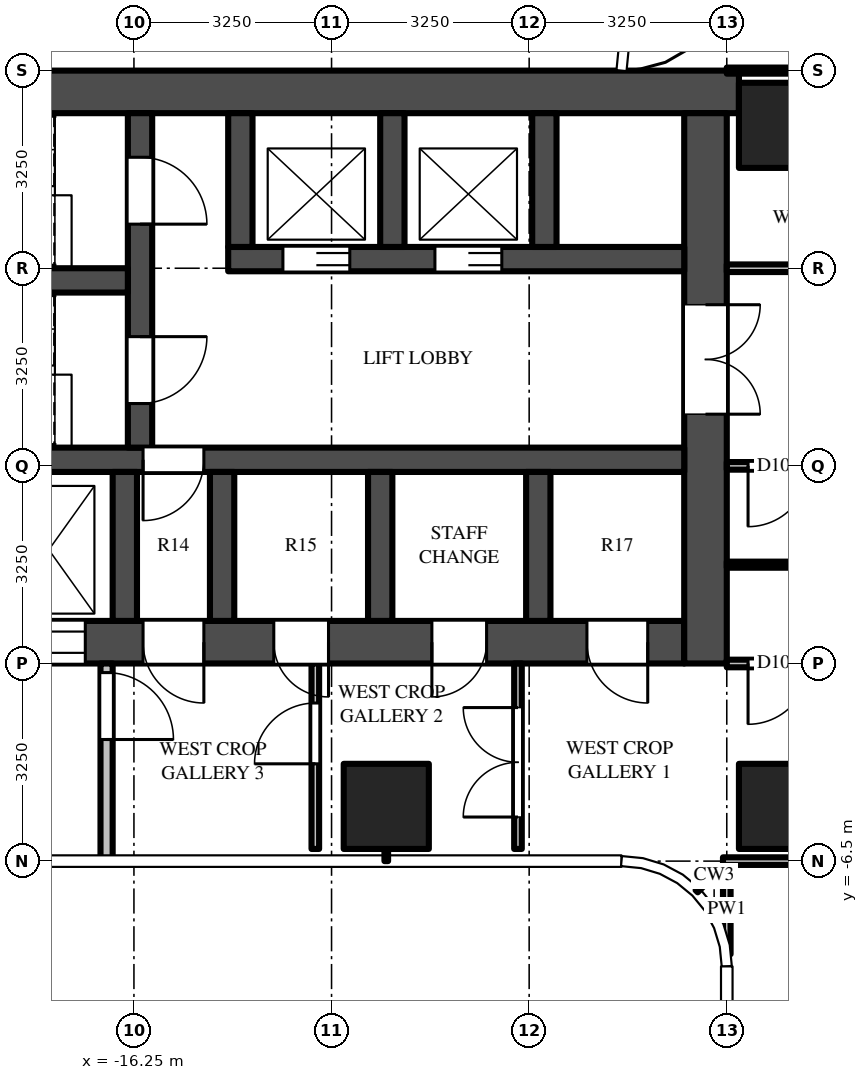
"""IFC4 building model, lengths in metres.
Left out: names, types, materials, properties, quantities, classifications, styles, units other than length and angle.
Written with IfcOpenShell. Run it as: python <this file> out.ifc"""

import sys

from ifc_helpers import new_model, si_unit, direction, frame, frame_2d, origin, origin_2d, place, context, subcontext, project, spatial, rectangle, extrude, source, transform, mapped, element, fill, save


model = new_model("IFC4")
c1 = context("Model", 3, precision=1e-05, world=origin(), true_north=direction((0.0, 1.0)))
c2 = subcontext(c1, "Body", "Model", "MODEL_VIEW")
j1 = project(units=[si_unit("LENGTHUNIT", "METRE"), si_unit("PLANEANGLEUNIT", "RADIAN")], contexts=[c1])
p1 = place(None, origin())
s1 = spatial("IfcSite", under=j1, at=p1, CompositionType="ELEMENT")
p2 = place(p1, origin())
s2 = spatial("IfcBuilding", under=s1, at=p2, CompositionType="ELEMENT")
p3 = place(p2, frame((0.0, 0.0, 88.0)))
s3 = spatial("IfcBuildingStorey", under=s2, at=p3, CompositionType="ELEMENT", Elevation=88.0)
m1 = source(origin(), c2, "Body", "SweptSolid", [
    extrude(rectangle(XDim=1.4, YDim=1.4, at=origin_2d()), origin(), (0.0, 0.0, 1.0), 4.5),
])
for number, where, z_axis, x_axis in (
    (1, (-5.6, 5.6, 0.0), (0.0, 0.0, 1.0), (1.0, 0.0, 0.0)),
    (2, (-5.6, -5.6, 0.0), (0.0, 0.0, 1.0), (1.0, 0.0, 0.0)),
    (3, (-12.1, -5.6, 0.0), (0.0, 0.0, 1.0), (1.0, 0.0, 0.0)),
):
    element("IfcColumn", number, at=place(p3, frame(where, z_axis=z_axis, x_axis=x_axis)), inside=s3, PredefinedType="COLUMN", context=c2, shape_type="MappedRepresentation", body=[
        mapped(m1, transform((0.0, 0.0, 0.0))),
    ])
m2 = source(origin(), c2, "Body", "SweptSolid", [
    extrude(rectangle(XDim=16.45, YDim=0.7, at=frame_2d((8.225, 0.0))), origin(), (0.0, 0.0, 1.0), 4.2),
])
p4 = place(p3, frame((-6.3, 6.15, 0.0), z_axis=(0.0, 0.0, 1.0), x_axis=(-1.0, 0.0, 0.0)))
e4 = element("IfcWall", 4, at=p4, inside=s3, PredefinedType="SHEAR", context=c2, shape_type="MappedRepresentation", body=[
    mapped(m2, transform((0.0, 0.0, 0.0))),
])
m3 = source(origin(), c2, "Body", "SweptSolid", [
    extrude(rectangle(XDim=14.85, YDim=0.7, at=frame_2d((7.425, 0.0))), origin(), (0.0, 0.0, 1.0), 4.2),
])
p5 = place(p3, frame((-7.2, -2.9, 0.0), z_axis=(0.0, 0.0, 1.0), x_axis=(-1.0, 0.0, 0.0)))
e5 = element("IfcWall", 5, at=p5, inside=s3, PredefinedType="SHEAR", context=c2, shape_type="MappedRepresentation", body=[
    mapped(m3, transform((0.0, 0.0, 0.0))),
])
m4 = source(origin(), c2, "Body", "SweptSolid", [
    extrude(rectangle(XDim=1.3, YDim=2.1, at=frame_2d((0.65, 1.05))), frame((0.0, 0.36, 0.0), z_axis=(0.0, -1.0, 0.0), x_axis=(1.0, 0.0, 0.0)), (0.0, 0.0, 1.0), 0.72),
])
p6 = place(p5, frame((12.2, 0.0, 0.0)))
e6 = element("IfcOpeningElement", 6, at=p6, cuts=e5, PredefinedType="OPENING", context=c2, shape_type="MappedRepresentation", body=[
    mapped(m4, transform((0.0, 0.0, 0.0))),
])
m5 = source(origin(), c2, "Body", "SweptSolid", [
    extrude(rectangle(XDim=1.2, YDim=2.1, at=frame_2d((0.6, 1.05))), frame((0.0, 0.36, 0.0), z_axis=(0.0, -1.0, 0.0), x_axis=(1.0, 0.0, 0.0)), (0.0, 0.0, 1.0), 0.72),
])
p7 = place(p5, frame((9.85, 0.0, 0.0)))
e7 = element("IfcOpeningElement", 7, at=p7, cuts=e5, PredefinedType="OPENING", context=c2, shape_type="MappedRepresentation", body=[
    mapped(m5, transform((0.0, 0.0, 0.0))),
])
m6 = source(origin(), c2, "Body", "SweptSolid", [
    extrude(rectangle(XDim=1.0, YDim=2.1, at=frame_2d((0.5, 1.05))), frame((0.0, 0.36, 0.0), z_axis=(0.0, -1.0, 0.0), x_axis=(1.0, 0.0, 0.0)), (0.0, 0.0, 1.0), 0.72),
])
p8 = place(p5, frame((7.9, 0.0, 0.0)))
e8 = element("IfcOpeningElement", 8, at=p8, cuts=e5, PredefinedType="OPENING", context=c2, shape_type="MappedRepresentation", body=[
    mapped(m6, transform((0.0, 0.0, 0.0))),
])
p9 = place(p5, frame((0.6, 0.0, 0.0)))
e9 = element("IfcOpeningElement", 9, at=p9, cuts=e5, PredefinedType="OPENING", context=c2, shape_type="MappedRepresentation", body=[
    mapped(m6, transform((0.0, 0.0, 0.0))),
])
m7 = source(origin(), c2, "Body", "SweptSolid", [
    extrude(rectangle(XDim=0.9, YDim=2.1, at=frame_2d((0.45, 1.05))), frame((0.0, 0.36, 0.0), z_axis=(0.0, -1.0, 0.0), x_axis=(1.0, 0.0, 0.0)), (0.0, 0.0, 1.0), 0.72),
])
p10 = place(p5, frame((3.25, 0.0, 0.0)))
e10 = element("IfcOpeningElement", 10, at=p10, cuts=e5, PredefinedType="OPENING", context=c2, shape_type="MappedRepresentation", body=[
    mapped(m7, transform((0.0, 0.0, 0.0))),
])
p11 = place(p5, frame((5.85, 0.0, 0.0)))
e11 = element("IfcOpeningElement", 11, at=p11, cuts=e5, PredefinedType="OPENING", context=c2, shape_type="MappedRepresentation", body=[
    mapped(m7, transform((0.0, 0.0, 0.0))),
])
m8 = source(origin(), c2, "Body", "SweptSolid", [
    extrude(rectangle(XDim=9.05, YDim=0.7, at=frame_2d((4.525, 0.0))), origin(), (0.0, 0.0, 1.0), 4.2),
])
p12 = place(p3, frame((-6.85, 5.8, 0.0), z_axis=(0.0, 0.0, 1.0), x_axis=(0.0, -1.0, 0.0)))
e12 = element("IfcWall", 12, at=p12, inside=s3, PredefinedType="SHEAR", context=c2, shape_type="MappedRepresentation", body=[
    mapped(m8, transform((0.0, 0.0, 0.0))),
])
m9 = source(origin(), c2, "Body", "SweptSolid", [
    extrude(rectangle(XDim=1.8, YDim=2.1, at=frame_2d((0.9, 1.05))), frame((0.0, 0.36, 0.0), z_axis=(0.0, -1.0, 0.0), x_axis=(1.0, 0.0, 0.0)), (0.0, 0.0, 1.0), 0.72),
])
p13 = place(p12, frame((3.15, 0.0, 0.0)))
e13 = element("IfcOpeningElement", 13, at=p13, cuts=e12, PredefinedType="OPENING", context=c2, shape_type="MappedRepresentation", body=[
    mapped(m9, transform((0.0, 0.0, 0.0))),
])
m10 = source(origin(), c2, "Body", "SweptSolid", [
    extrude(rectangle(XDim=7.5, YDim=0.4, at=frame_2d((3.75, 0.0))), origin(), (0.0, 0.0, 1.0), 4.2),
])
p14 = place(p3, frame((-7.2, 3.4, 0.0), z_axis=(0.0, 0.0, 1.0), x_axis=(-1.0, 0.0, 0.0)))
e14 = element("IfcWall", 14, at=p14, inside=s3, PredefinedType="SHEAR", context=c2, shape_type="MappedRepresentation", body=[
    mapped(m10, transform((0.0, 0.0, 0.0))),
])
m11 = source(origin(), c2, "Body", "SweptSolid", [
    extrude(rectangle(XDim=1.1, YDim=2.1, at=frame_2d((0.55, 1.05))), frame((0.0, 0.21, 0.0), z_axis=(0.0, -1.0, 0.0), x_axis=(1.0, 0.0, 0.0)), (0.0, 0.0, 1.0), 0.42),
])
p15 = place(p14, frame((3.0, 0.0, 0.0)))
e15 = element("IfcOpeningElement", 15, at=p15, cuts=e14, PredefinedType="OPENING", context=c2, shape_type="MappedRepresentation", body=[
    mapped(m11, transform((0.0, 0.0, 0.0))),
])
p16 = place(p14, frame((5.5, 0.0, 0.0)))
e16 = element("IfcOpeningElement", 16, at=p16, cuts=e14, PredefinedType="OPENING", context=c2, shape_type="MappedRepresentation", body=[
    mapped(m11, transform((0.0, 0.0, 0.0))),
])
m12 = source(origin(), c2, "Body", "SweptSolid", [
    extrude(rectangle(XDim=14.85, YDim=0.4, at=frame_2d((7.425, 0.0))), origin(), (0.0, 0.0, 1.0), 4.2),
])
p17 = place(p3, frame((-7.2, 0.1, 0.0), z_axis=(0.0, 0.0, 1.0), x_axis=(-1.0, 0.0, 0.0)))
e17 = element("IfcWall", 17, at=p17, inside=s3, PredefinedType="SHEAR", context=c2, shape_type="MappedRepresentation", body=[
    mapped(m12, transform((0.0, 0.0, 0.0))),
])
m13 = source(origin(), c2, "Body", "SweptSolid", [
    extrude(rectangle(XDim=1.0, YDim=2.1, at=frame_2d((0.5, 1.05))), frame((0.0, 0.21, 0.0), z_axis=(0.0, -1.0, 0.0), x_axis=(1.0, 0.0, 0.0)), (0.0, 0.0, 1.0), 0.42),
])
p18 = place(p17, frame((7.9, 0.0, 0.0)))
e18 = element("IfcOpeningElement", 18, at=p18, cuts=e17, PredefinedType="OPENING", context=c2, shape_type="MappedRepresentation", body=[
    mapped(m13, transform((0.0, 0.0, 0.0))),
])
m14 = source(origin(), c2, "Body", "SweptSolid", [
    extrude(rectangle(XDim=5.5, YDim=0.4, at=frame_2d((2.75, 0.0))), origin(), (0.0, 0.0, 1.0), 4.2),
])
p19 = place(p3, frame((-16.15, 5.8, 0.0), z_axis=(0.0, 0.0, 1.0), x_axis=(0.0, -1.0, 0.0)))
e19 = element("IfcWall", 19, at=p19, inside=s3, PredefinedType="SHEAR", context=c2, shape_type="MappedRepresentation", body=[
    mapped(m14, transform((0.0, 0.0, 0.0))),
])
p20 = place(p19, frame((0.725, 0.0, 0.0)))
e20 = element("IfcOpeningElement", 20, at=p20, cuts=e19, PredefinedType="OPENING", context=c2, shape_type="MappedRepresentation", body=[
    mapped(m11, transform((0.0, 0.0, 0.0))),
])
p21 = place(p19, frame((3.675, 0.0, 0.0)))
e21 = element("IfcOpeningElement", 21, at=p21, cuts=e19, PredefinedType="OPENING", context=c2, shape_type="MappedRepresentation", body=[
    mapped(m11, transform((0.0, 0.0, 0.0))),
])
m15 = source(origin(), c2, "Body", "SweptSolid", [
    extrude(rectangle(XDim=5.7, YDim=0.4, at=frame_2d((2.85, 0.0))), origin(), (0.0, 0.0, 1.0), 4.2),
])
p22 = place(p3, frame((-16.35, 3.05, 0.0), z_axis=(0.0, 0.0, 1.0), x_axis=(-1.0, 0.0, 0.0)))
e22 = element("IfcWall", 22, at=p22, inside=s3, PredefinedType="SHEAR", context=c2, shape_type="MappedRepresentation", body=[
    mapped(m15, transform((0.0, 0.0, 0.0))),
])
m16 = source(origin(), c2, "Body", "SweptSolid", [
    extrude(rectangle(XDim=2.2, YDim=0.4, at=frame_2d((1.1, 0.0))), origin(), (0.0, 0.0, 1.0), 4.2),
])
for number, where, z_axis, x_axis in (
    (23, (-9.5, 5.8, 0.0), (0.0, 0.0, 1.0), (0.0, -1.0, 0.0)),
    (24, (-12.0, 5.8, 0.0), (0.0, 0.0, 1.0), (0.0, -1.0, 0.0)),
    (25, (-14.5, 5.8, 0.0), (0.0, 0.0, 1.0), (0.0, -1.0, 0.0)),
):
    element("IfcWall", number, at=place(p3, frame(where, z_axis=z_axis, x_axis=x_axis)), inside=s3, PredefinedType="SHEAR", context=c2, shape_type="MappedRepresentation", body=[
        mapped(m16, transform((0.0, 0.0, 0.0))),
    ])
m17 = source(origin(), c2, "Body", "SweptSolid", [
    extrude(rectangle(XDim=2.45, YDim=0.4, at=frame_2d((1.225, 0.0))), origin(), (0.0, 0.0, 1.0), 4.2),
])
for number, where, z_axis, x_axis in (
    (26, (-9.6, -0.1, 0.0), (0.0, 0.0, 1.0), (0.0, -1.0, 0.0)),
    (27, (-12.2, -0.1, 0.0), (0.0, 0.0, 1.0), (0.0, -1.0, 0.0)),
    (28, (-14.8, -0.1, 0.0), (0.0, 0.0, 1.0), (0.0, -1.0, 0.0)),
    (29, (-16.4, -0.1, 0.0), (0.0, 0.0, 1.0), (0.0, -1.0, 0.0)),
):
    element("IfcWall", number, at=place(p3, frame(where, z_axis=z_axis, x_axis=x_axis)), inside=s3, PredefinedType="SHEAR", context=c2, shape_type="MappedRepresentation", body=[
        mapped(m17, transform((0.0, 0.0, 0.0))),
    ])
m18 = source(origin(), c2, "Body", "SweptSolid", [
    extrude(rectangle(XDim=3.25, YDim=0.2, at=frame_2d((1.625, 0.0))), origin(), (0.0, 0.0, 1.0), 4.2),
])
p23 = place(p3, frame((-16.7, -3.25, 0.0), z_axis=(0.0, 0.0, 1.0), x_axis=(0.0, -1.0, 0.0)))
e30 = element("IfcWall", 30, at=p23, inside=s3, PredefinedType="PARTITIONING", context=c2, shape_type="MappedRepresentation", body=[
    mapped(m18, transform((0.0, 0.0, 0.0))),
])
m19 = source(origin(), c2, "Body", "SweptSolid", [
    extrude(rectangle(XDim=1.1, YDim=2.1, at=frame_2d((0.55, 1.05))), frame((0.0, 0.11, 0.0), z_axis=(0.0, -1.0, 0.0), x_axis=(1.0, 0.0, 0.0)), (0.0, 0.0, 1.0), 0.22),
])
p24 = place(p23, frame((0.15, 0.0, 0.0)))
e31 = element("IfcOpeningElement", 31, at=p24, cuts=e30, PredefinedType="OPENING", context=c2, shape_type="MappedRepresentation", body=[
    mapped(m19, transform((0.0, 0.0, 0.0))),
])
m20 = source(origin(), c2, "Body", "SweptSolid", [
    extrude(rectangle(XDim=3.05, YDim=0.125, at=frame_2d((1.525, 0.0))), origin(), (0.0, 0.0, 1.0), 3.28),
])
p25 = place(p3, frame((-13.267, -6.3, 0.0), z_axis=(0.0, 0.0, 1.0), x_axis=(0.0, 1.0, 0.0)))
e32 = element("IfcWall", 32, at=p25, inside=s3, PredefinedType="PARTITIONING", context=c2, shape_type="MappedRepresentation", body=[
    mapped(m20, transform((0.0, 0.0, 0.0))),
])
m21 = source(origin(), c2, "Body", "SweptSolid", [
    extrude(rectangle(XDim=1.0, YDim=2.1, at=frame_2d((0.5, 1.05))), frame((0.0, 0.073, 0.0), z_axis=(0.0, -1.0, 0.0), x_axis=(1.0, 0.0, 0.0)), (0.0, 0.0, 1.0), 0.145),
])
p26 = place(p25, frame((1.4, 0.0, 0.0)))
e33 = element("IfcOpeningElement", 33, at=p26, cuts=e32, PredefinedType="OPENING", context=c2, shape_type="MappedRepresentation", body=[
    mapped(m21, transform((0.0, 0.0, 0.0))),
])
p27 = place(p3, frame((-9.934, -6.3, 0.0), z_axis=(0.0, 0.0, 1.0), x_axis=(0.0, 1.0, 0.0)))
e34 = element("IfcWall", 34, at=p27, inside=s3, PredefinedType="PARTITIONING", context=c2, shape_type="MappedRepresentation", body=[
    mapped(m20, transform((0.0, 0.0, 0.0))),
])
m22 = source(origin(), c2, "Body", "SweptSolid", [
    extrude(rectangle(XDim=1.8, YDim=2.1, at=frame_2d((0.9, 1.05))), frame((0.0, 0.073, 0.0), z_axis=(0.0, -1.0, 0.0), x_axis=(1.0, 0.0, 0.0)), (0.0, 0.0, 1.0), 0.145),
])
p28 = place(p27, frame((0.525, 0.0, 0.0)))
e35 = element("IfcOpeningElement", 35, at=p28, cuts=e34, PredefinedType="OPENING", context=c2, shape_type="MappedRepresentation", body=[
    mapped(m22, transform((0.0, 0.0, 0.0))),
])
m23 = source(origin(), c2, "Body", "SweptSolid", [
    extrude(rectangle(XDim=1.469, YDim=0.125, at=frame_2d((0.734, 0.0))), origin(), (0.0, 0.0, 1.0), 4.2),
])
p29 = place(p3, frame((-6.5, -6.562, 0.0), z_axis=(0.0, 0.0, 1.0), x_axis=(0.0, -1.0, 0.0)))
e36 = element("IfcWall", 36, at=p29, inside=s3, PredefinedType="PARTITIONING", context=c2, shape_type="MappedRepresentation", body=[
    mapped(m23, transform((0.0, 0.0, 0.0))),
])
m24 = source(origin(), c2, "Body", "SweptSolid", [
    extrude(rectangle(XDim=3.725, YDim=0.125, at=frame_2d((1.863, 0.0))), origin(), (0.0, 0.0, 1.0), 3.28),
])
p30 = place(p3, frame((-2.837, -6.5, 0.0), z_axis=(0.0, 0.0, 1.0), x_axis=(-1.0, 0.0, 0.0)))
e37 = element("IfcWall", 37, at=p30, inside=s3, PredefinedType="PARTITIONING", context=c2, shape_type="MappedRepresentation", body=[
    mapped(m24, transform((0.0, 0.0, 0.0))),
])
m25 = source(origin(), c2, "Body", "SweptSolid", [
    extrude(rectangle(XDim=5.363, YDim=0.125, at=frame_2d((2.681, 0.0))), origin(), (0.0, 0.0, 1.0), 3.418),
])
p31 = place(p3, frame((-1.137, -3.25, 0.0), z_axis=(0.0, 0.0, 1.0), x_axis=(-1.0, 0.0, 0.0)))
e38 = element("IfcWall", 38, at=p31, inside=s3, PredefinedType="PARTITIONING", context=c2, shape_type="MappedRepresentation", body=[
    mapped(m25, transform((0.0, 0.0, 0.0))),
])
p32 = place(p31, frame((4.012, 0.0, 0.0)))
e39 = element("IfcOpeningElement", 39, at=p32, cuts=e38, PredefinedType="OPENING", context=c2, shape_type="MappedRepresentation", body=[
    mapped(m21, transform((0.0, 0.0, 0.0))),
])
p33 = place(p3, frame((-6.5, -1.625, 0.0), z_axis=(0.0, 0.0, 1.0), x_axis=(1.0, 0.0, 0.0)))
e40 = element("IfcWall", 40, at=p33, inside=s3, PredefinedType="PARTITIONING", context=c2, shape_type="SweptSolid", body=[
    extrude(rectangle(XDim=5.238, YDim=0.1, at=frame_2d((2.619, 0.0))), origin(), (0.0, 0.0, 1.0), 3.418),
])
p34 = place(p3, frame((-1.137, 0.0, 0.0), z_axis=(0.0, 0.0, 1.0), x_axis=(-1.0, 0.0, 0.0)))
e41 = element("IfcWall", 41, at=p34, inside=s3, PredefinedType="PARTITIONING", context=c2, shape_type="MappedRepresentation", body=[
    mapped(m25, transform((0.0, 0.0, 0.0))),
])
p35 = place(p34, frame((4.012, 0.0, 0.0)))
e42 = element("IfcOpeningElement", 42, at=p35, cuts=e41, PredefinedType="OPENING", context=c2, shape_type="MappedRepresentation", body=[
    mapped(m21, transform((0.0, 0.0, 0.0))),
])
p36 = place(p3, frame((-6.5, 3.25, 0.0), z_axis=(0.0, 0.0, 1.0), x_axis=(1.0, 0.0, 0.0)))
e43 = element("IfcWall", 43, at=p36, inside=s3, PredefinedType="PARTITIONING", context=c2, shape_type="MappedRepresentation", body=[
    mapped(m25, transform((0.0, 0.0, 0.0))),
])
p37 = place(p36, frame((3.95, 0.0, 0.0)))
e44 = element("IfcOpeningElement", 44, at=p37, cuts=e43, PredefinedType="OPENING", context=c2, shape_type="MappedRepresentation", body=[
    mapped(m21, transform((0.0, 0.0, 0.0))),
])
m26 = source(origin(), c2, "Body", "SweptSolid", [
    extrude(rectangle(XDim=5.363, YDim=0.1, at=frame_2d((2.681, 0.0))), origin(), (0.0, 0.0, 1.0), 3.28),
])
p38 = place(p3, frame((-6.5, 6.5, 0.0), z_axis=(0.0, 0.0, 1.0), x_axis=(1.0, 0.0, 0.0)))
e45 = element("IfcWall", 45, at=p38, inside=s3, PredefinedType="PARTITIONING", context=c2, shape_type="MappedRepresentation", body=[
    mapped(m26, transform((0.0, 0.0, 0.0))),
])
m27 = source(origin(), c2, "Body", "SweptSolid", [
    extrude(rectangle(XDim=1.1, YDim=2.1, at=frame_2d((0.55, 1.05))), frame((0.0, 0.025, 0.0), z_axis=(0.0, -1.0, 0.0), x_axis=(1.0, 0.0, 0.0)), (0.0, 0.0, 1.0), 0.05),
])
p39 = place(p15, origin())
e46 = element("IfcDoor", 46, at=p39, inside=s3, OperationType="DOUBLE_DOOR_SLIDING", PredefinedType="DOOR", context=c2, shape_type="MappedRepresentation", body=[
    mapped(m27, transform((0.0, 0.0, 0.0))),
])
fill(e15, e46)
p40 = place(p16, origin())
e47 = element("IfcDoor", 47, at=p40, inside=s3, OperationType="DOUBLE_DOOR_SLIDING", PredefinedType="DOOR", context=c2, shape_type="MappedRepresentation", body=[
    mapped(m27, transform((0.0, 0.0, 0.0))),
])
fill(e16, e47)
m28 = source(origin(), c2, "Body", "SweptSolid", [
    extrude(rectangle(XDim=1.2, YDim=2.1, at=frame_2d((0.6, 1.05))), frame((0.0, -0.275, 0.0), z_axis=(0.0, -1.0, 0.0), x_axis=(1.0, 0.0, 0.0)), (0.0, 0.0, 1.0), 0.05),
])
p41 = place(p7, origin())
e48 = element("IfcDoor", 48, at=p41, inside=s3, OperationType="DOUBLE_DOOR_SLIDING", PredefinedType="DOOR", context=c2, shape_type="MappedRepresentation", body=[
    mapped(m28, transform((0.0, 0.0, 0.0))),
])
fill(e7, e48)
m29 = source(origin(), c2, "Body", "SweptSolid", [
    extrude(rectangle(XDim=1.8, YDim=2.1, at=frame_2d((0.9, 1.05))), frame((0.0, -0.275, 0.0), z_axis=(0.0, -1.0, 0.0), x_axis=(1.0, 0.0, 0.0)), (0.0, 0.0, 1.0), 0.05),
])
p42 = place(p13, origin())
e49 = element("IfcDoor", 49, at=p42, inside=s3, OperationType="DOUBLE_DOOR_SINGLE_SWING", PredefinedType="DOOR", context=c2, shape_type="MappedRepresentation", body=[
    mapped(m29, transform((0.0, 0.0, 0.0))),
])
fill(e13, e49)
p43 = place(p20, origin())
e50 = element("IfcDoor", 50, at=p43, inside=s3, OperationType="SINGLE_SWING_RIGHT", PredefinedType="DOOR", context=c2, shape_type="MappedRepresentation", body=[
    mapped(m27, transform((0.0, 0.0, 0.0))),
])
fill(e20, e50)
p44 = place(p21, origin())
e51 = element("IfcDoor", 51, at=p44, inside=s3, OperationType="SINGLE_SWING_LEFT", PredefinedType="DOOR", context=c2, shape_type="MappedRepresentation", body=[
    mapped(m27, transform((0.0, 0.0, 0.0))),
])
fill(e21, e51)
m30 = source(origin(), c2, "Body", "SweptSolid", [
    extrude(rectangle(XDim=1.0, YDim=2.1, at=frame_2d((0.5, 1.05))), frame((0.0, 0.025, 0.0), z_axis=(0.0, -1.0, 0.0), x_axis=(1.0, 0.0, 0.0)), (0.0, 0.0, 1.0), 0.05),
])
p45 = place(p18, origin())
e52 = element("IfcDoor", 52, at=p45, inside=s3, OperationType="SINGLE_SWING_RIGHT", PredefinedType="DOOR", context=c2, shape_type="MappedRepresentation", body=[
    mapped(m30, transform((0.0, 0.0, 0.0))),
])
fill(e18, e52)
m31 = source(origin(), c2, "Body", "SweptSolid", [
    extrude(rectangle(XDim=1.0, YDim=2.1, at=frame_2d((0.5, 1.05))), frame((0.0, -0.275, 0.0), z_axis=(0.0, -1.0, 0.0), x_axis=(1.0, 0.0, 0.0)), (0.0, 0.0, 1.0), 0.05),
])
p46 = place(p8, origin())
e53 = element("IfcDoor", 53, at=p46, inside=s3, OperationType="SINGLE_SWING_LEFT", PredefinedType="DOOR", context=c2, shape_type="MappedRepresentation", body=[
    mapped(m31, transform((0.0, 0.0, 0.0))),
])
fill(e8, e53)
p47 = place(p24, origin())
e54 = element("IfcDoor", 54, at=p47, inside=s3, OperationType="SINGLE_SWING_RIGHT", PredefinedType="DOOR", context=c2, shape_type="MappedRepresentation", body=[
    mapped(m27, transform((0.0, 0.0, 0.0))),
])
fill(e31, e54)
p48 = place(p9, origin())
e55 = element("IfcDoor", 55, at=p48, inside=s3, OperationType="SINGLE_SWING_LEFT", PredefinedType="DOOR", context=c2, shape_type="MappedRepresentation", body=[
    mapped(m31, transform((0.0, 0.0, 0.0))),
])
fill(e9, e55)
m32 = source(origin(), c2, "Body", "SweptSolid", [
    extrude(rectangle(XDim=0.9, YDim=2.1, at=frame_2d((0.45, 1.05))), frame((0.0, -0.275, 0.0), z_axis=(0.0, -1.0, 0.0), x_axis=(1.0, 0.0, 0.0)), (0.0, 0.0, 1.0), 0.05),
])
p49 = place(p10, origin())
e56 = element("IfcDoor", 56, at=p49, inside=s3, OperationType="SINGLE_SWING_RIGHT", PredefinedType="DOOR", context=c2, shape_type="MappedRepresentation", body=[
    mapped(m32, transform((0.0, 0.0, 0.0))),
])
fill(e10, e56)
p50 = place(p11, origin())
e57 = element("IfcDoor", 57, at=p50, inside=s3, OperationType="SINGLE_SWING_LEFT", PredefinedType="DOOR", context=c2, shape_type="MappedRepresentation", body=[
    mapped(m32, transform((0.0, 0.0, 0.0))),
])
fill(e11, e57)
m33 = source(origin(), c2, "Body", "SweptSolid", [
    extrude(rectangle(XDim=1.8, YDim=2.1, at=frame_2d((0.9, 1.05))), frame((0.0, 0.025, 0.0), z_axis=(0.0, -1.0, 0.0), x_axis=(1.0, 0.0, 0.0)), (0.0, 0.0, 1.0), 0.05),
])
p51 = place(p28, origin())
e58 = element("IfcDoor", 58, at=p51, inside=s3, OperationType="DOUBLE_DOOR_SINGLE_SWING", PredefinedType="DOOR", context=c2, shape_type="MappedRepresentation", body=[
    mapped(m33, transform((0.0, 0.0, 0.0))),
])
fill(e35, e58)
p52 = place(p26, origin())
e59 = element("IfcDoor", 59, at=p52, inside=s3, OperationType="SINGLE_SWING_LEFT", PredefinedType="DOOR", context=c2, shape_type="MappedRepresentation", body=[
    mapped(m30, transform((0.0, 0.0, 0.0))),
])
fill(e33, e59)
p53 = place(p32, origin())
e60 = element("IfcDoor", 60, at=p53, inside=s3, OperationType="SINGLE_SWING_RIGHT", PredefinedType="DOOR", context=c2, shape_type="MappedRepresentation", body=[
    mapped(m30, transform((0.0, 0.0, 0.0))),
])
fill(e39, e60)
p54 = place(p35, origin())
e61 = element("IfcDoor", 61, at=p54, inside=s3, OperationType="SINGLE_SWING_RIGHT", PredefinedType="DOOR", context=c2, shape_type="MappedRepresentation", body=[
    mapped(m30, transform((0.0, 0.0, 0.0))),
])
fill(e42, e61)
save(model, sys.argv[1])
